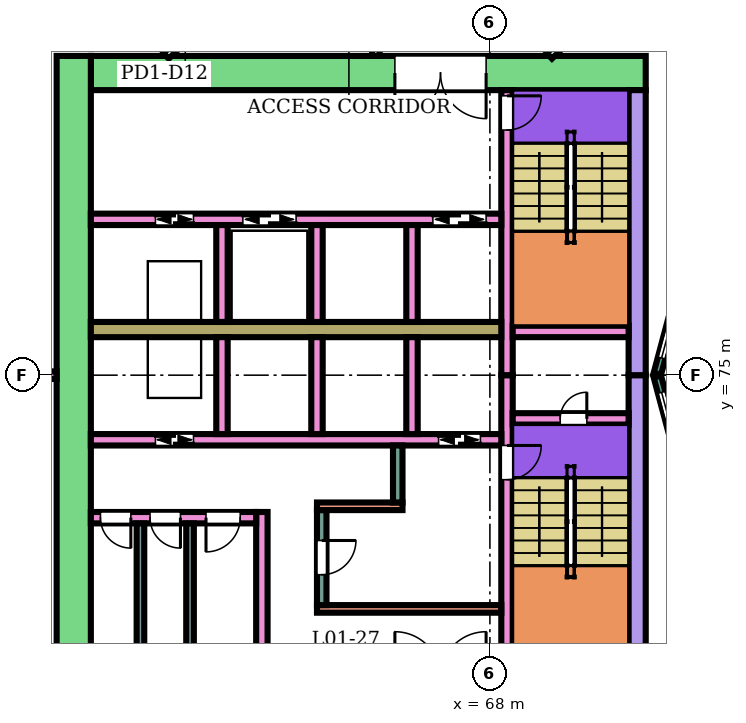
"""IFC4 building model, lengths in metres.
Left out: names, types, materials, properties, quantities, classifications, styles, units other than length and angle.
Written with IfcOpenShell. Run it as: python <this file> out.ifc"""

import sys

from ifc_helpers import new_model, si_unit, direction, frame, frame_2d, origin, place, context, subcontext, project, spatial, rectangle, extrude, element, fill, save


model = new_model("IFC4")
c1 = context("Model", 3, precision=1e-05, world=origin(), true_north=direction((0.0, 1.0)))
c2 = subcontext(c1, "Body", "Model", "MODEL_VIEW")
j1 = project(units=[si_unit("LENGTHUNIT", "METRE"), si_unit("PLANEANGLEUNIT", "RADIAN")], contexts=[c1])
p1 = place(None, origin())
s1 = spatial("IfcSite", under=j1, at=p1, CompositionType="ELEMENT")
p2 = place(p1, origin())
s2 = spatial("IfcBuilding", under=s1, at=p2, CompositionType="ELEMENT")
p3 = place(p2, frame((0.0, 0.0, 7.0)))
s3 = spatial("IfcBuildingStorey", under=s2, at=p3, CompositionType="ELEMENT", Elevation=7.0)
p4 = place(p3, frame((72.1, 82.95, 0.0), z_axis=(0.0, 0.0, 1.0), x_axis=(-1.0, 0.0, 0.0)))
e1 = element("IfcWall", 1, at=p4, inside=s3, PredefinedType="SHEAR", context=c2, shape_type="SweptSolid", body=[
    extrude(rectangle(XDim=14.6, YDim=0.9, at=frame_2d((7.3, 0.0))), origin(), (0.0, 0.0, 1.0), 4.95),
])
p5 = place(p4, frame((4.2, 0.0, 0.0)))
e2 = element("IfcOpeningElement", 2, at=p5, cuts=e1, PredefinedType="OPENING", context=c2, shape_type="SweptSolid", body=[
    extrude(rectangle(XDim=2.4, YDim=2.4, at=frame_2d((1.2, 1.2))), frame((0.0, 0.46, 0.0), z_axis=(0.0, -1.0, 0.0), x_axis=(1.0, 0.0, 0.0)), (0.0, 0.0, 1.0), 0.92),
])
for number, where, z_axis, x_axis in (
    (3, (71.875, 75.0, 0.0), (0.0, 0.0, 1.0), (0.0, -1.0, 0.0)),
    (4, (71.875, 82.5, 0.0), (0.0, 0.0, 1.0), (0.0, -1.0, 0.0)),
):
    element("IfcWall", number, at=place(p3, frame(where, z_axis=z_axis, x_axis=x_axis)), inside=s3, PredefinedType="SHEAR", context=c2, shape_type="SweptSolid", body=[
        extrude(rectangle(XDim=7.5, YDim=0.45, at=frame_2d((3.75, 0.0))), origin(), (0.0, 0.0, 1.0), 4.95),
    ])
p6 = place(p3, frame((57.05, 83.4, 0.0), z_axis=(0.0, 0.0, 1.0), x_axis=(0.0, -1.0, 0.0)))
e5 = element("IfcWall", 5, at=p6, inside=s3, PredefinedType="SHEAR", context=c2, shape_type="SweptSolid", body=[
    extrude(rectangle(XDim=16.8, YDim=0.9, at=frame_2d((8.4, 0.0))), origin(), (0.0, 0.0, 1.0), 4.95),
])
p7 = place(p3, frame((68.45, 75.0, 0.0), z_axis=(0.0, 0.0, 1.0), x_axis=(0.0, -1.0, 0.0)))
e6 = element("IfcWall", 6, at=p7, inside=s3, PredefinedType="SHEAR", context=c2, shape_type="SweptSolid", body=[
    extrude(rectangle(XDim=7.5, YDim=0.3, at=frame_2d((3.75, 0.0))), origin(), (0.0, 0.0, 1.0), 4.95),
])
p8 = place(p7, frame((1.85, 0.0, 0.0)))
e7 = element("IfcOpeningElement", 7, at=p8, cuts=e6, PredefinedType="OPENING", context=c2, shape_type="SweptSolid", body=[
    extrude(rectangle(XDim=0.9, YDim=2.1, at=frame_2d((0.45, 1.05))), frame((0.0, 0.16, 0.0), z_axis=(0.0, -1.0, 0.0), x_axis=(1.0, 0.0, 0.0)), (0.0, 0.0, 1.0), 0.32),
])
p9 = place(p3, frame((68.45, 82.5, 0.0), z_axis=(0.0, 0.0, 1.0), x_axis=(0.0, -1.0, 0.0)))
e8 = element("IfcWall", 8, at=p9, inside=s3, PredefinedType="SHEAR", context=c2, shape_type="SweptSolid", body=[
    extrude(rectangle(XDim=7.5, YDim=0.3, at=frame_2d((3.75, 0.0))), origin(), (0.0, 0.0, 1.0), 4.95),
])
p10 = place(p9, frame((0.15, 0.0, 0.0)))
e9 = element("IfcOpeningElement", 9, at=p10, cuts=e8, PredefinedType="OPENING", context=c2, shape_type="SweptSolid", body=[
    extrude(rectangle(XDim=0.9, YDim=2.1, at=frame_2d((0.45, 1.05))), frame((0.0, 0.16, 0.0), z_axis=(0.0, -1.0, 0.0), x_axis=(1.0, 0.0, 0.0)), (0.0, 0.0, 1.0), 0.32),
])
p11 = place(p3, frame((71.65, 73.85, 0.0), z_axis=(0.0, 0.0, 1.0), x_axis=(-1.0, 0.0, 0.0)))
e10 = element("IfcWall", 10, at=p11, inside=s3, PredefinedType="SHEAR", context=c2, shape_type="SweptSolid", body=[
    extrude(rectangle(XDim=3.05, YDim=0.3, at=frame_2d((1.525, 0.0))), origin(), (0.0, 0.0, 1.0), 4.95),
])
p12 = place(p11, frame((1.1, 0.0, 0.0)))
e11 = element("IfcOpeningElement", 11, at=p12, cuts=e10, PredefinedType="OPENING", context=c2, shape_type="SweptSolid", body=[
    extrude(rectangle(XDim=0.7, YDim=2.0, at=frame_2d((0.35, 1.0))), frame((0.0, 0.16, 0.0), z_axis=(0.0, -1.0, 0.0), x_axis=(1.0, 0.0, 0.0)), (0.0, 0.0, 1.0), 0.32),
])
p13 = place(p3, frame((71.65, 76.15, 0.0), z_axis=(0.0, 0.0, 1.0), x_axis=(-1.0, 0.0, 0.0)))
e12 = element("IfcWall", 12, at=p13, inside=s3, PredefinedType="SHEAR", context=c2, shape_type="SweptSolid", body=[
    extrude(rectangle(XDim=3.05, YDim=0.3, at=frame_2d((1.525, 0.0))), origin(), (0.0, 0.0, 1.0), 4.95),
])
p14 = place(p3, frame((68.3, 73.3, 0.0), z_axis=(0.0, 0.0, 1.0), x_axis=(-1.0, 0.0, 0.0)))
e13 = element("IfcWall", 13, at=p14, inside=s3, PredefinedType="SHEAR", context=c2, shape_type="SweptSolid", body=[
    extrude(rectangle(XDim=10.8, YDim=0.3, at=frame_2d((5.4, 0.0))), origin(), (0.0, 0.0, 1.0), 4.95),
])
p15 = place(p14, frame((0.55, 0.0, 0.0)))
e14 = element("IfcOpeningElement", 14, at=p15, cuts=e13, PredefinedType="OPENING", context=c2, shape_type="SweptSolid", body=[
    extrude(rectangle(XDim=1.1, YDim=2.1, at=frame_2d((0.55, 1.05))), frame((0.0, 0.16, 0.0), z_axis=(0.0, -1.0, 0.0), x_axis=(1.0, 0.0, 0.0)), (0.0, 0.0, 1.0), 0.32),
])
p16 = place(p14, frame((8.1, 0.0, 0.0)))
e15 = element("IfcOpeningElement", 15, at=p16, cuts=e13, PredefinedType="OPENING", context=c2, shape_type="SweptSolid", body=[
    extrude(rectangle(XDim=1.0, YDim=2.1, at=frame_2d((0.5, 1.05))), frame((0.0, 0.16, 0.0), z_axis=(0.0, -1.0, 0.0), x_axis=(1.0, 0.0, 0.0)), (0.0, 0.0, 1.0), 0.32),
])
p17 = place(p3, frame((68.3, 76.2, 0.0), z_axis=(0.0, 0.0, 1.0), x_axis=(-1.0, 0.0, 0.0)))
e16 = element("IfcWall", 16, at=p17, inside=s3, PredefinedType="SHEAR", context=c2, shape_type="SweptSolid", body=[
    extrude(rectangle(XDim=10.8, YDim=0.4, at=frame_2d((5.4, 0.0))), origin(), (0.0, 0.0, 1.0), 4.95),
])
p18 = place(p3, frame((68.3, 79.1, 0.0), z_axis=(0.0, 0.0, 1.0), x_axis=(-1.0, 0.0, 0.0)))
e17 = element("IfcWall", 17, at=p18, inside=s3, PredefinedType="SHEAR", context=c2, shape_type="SweptSolid", body=[
    extrude(rectangle(XDim=10.8, YDim=0.3, at=frame_2d((5.4, 0.0))), origin(), (0.0, 0.0, 1.0), 4.95),
])
p19 = place(p18, frame((0.4, 0.0, 0.0)))
e18 = element("IfcOpeningElement", 18, at=p19, cuts=e17, PredefinedType="OPENING", context=c2, shape_type="SweptSolid", body=[
    extrude(rectangle(XDim=1.4, YDim=2.1, at=frame_2d((0.7, 1.05))), frame((0.0, 0.16, 0.0), z_axis=(0.0, -1.0, 0.0), x_axis=(1.0, 0.0, 0.0)), (0.0, 0.0, 1.0), 0.32),
])
p20 = place(p18, frame((5.4, 0.0, 0.0)))
e19 = element("IfcOpeningElement", 19, at=p20, cuts=e17, PredefinedType="OPENING", context=c2, shape_type="SweptSolid", body=[
    extrude(rectangle(XDim=1.4, YDim=2.1, at=frame_2d((0.7, 1.05))), frame((0.0, 0.16, 0.0), z_axis=(0.0, -1.0, 0.0), x_axis=(1.0, 0.0, 0.0)), (0.0, 0.0, 1.0), 0.32),
])
p21 = place(p18, frame((8.1, 0.0, 0.0)))
e20 = element("IfcOpeningElement", 20, at=p21, cuts=e17, PredefinedType="OPENING", context=c2, shape_type="SweptSolid", body=[
    extrude(rectangle(XDim=1.0, YDim=2.1, at=frame_2d((0.5, 1.05))), frame((0.0, 0.16, 0.0), z_axis=(0.0, -1.0, 0.0), x_axis=(1.0, 0.0, 0.0)), (0.0, 0.0, 1.0), 0.32),
])
for number, where, z_axis, x_axis in (
    (21, (65.95, 76.0, 0.0), (0.0, 0.0, 1.0), (0.0, -1.0, 0.0)),
    (22, (63.45, 76.0, 0.0), (0.0, 0.0, 1.0), (0.0, -1.0, 0.0)),
    (23, (60.95, 76.0, 0.0), (0.0, 0.0, 1.0), (0.0, -1.0, 0.0)),
    (24, (65.95, 78.95, 0.0), (0.0, 0.0, 1.0), (0.0, -1.0, 0.0)),
    (25, (63.45, 78.95, 0.0), (0.0, 0.0, 1.0), (0.0, -1.0, 0.0)),
    (26, (60.95, 78.95, 0.0), (0.0, 0.0, 1.0), (0.0, -1.0, 0.0)),
):
    element("IfcWall", number, at=place(p3, frame(where, z_axis=z_axis, x_axis=x_axis)), inside=s3, PredefinedType="SHEAR", context=c2, shape_type="SweptSolid", body=[
        extrude(rectangle(XDim=2.55, YDim=0.3, at=frame_2d((1.275, 0.0))), origin(), (0.0, 0.0, 1.0), 4.95),
    ])
p22 = place(p3, frame((68.3, 68.85, 0.0), z_axis=(0.0, 0.0, 1.0), x_axis=(-1.0, 0.0, 0.0)))
e27 = element("IfcWall", 27, at=p22, inside=s3, PredefinedType="SHEAR", context=c2, shape_type="SweptSolid", body=[
    extrude(rectangle(XDim=4.85, YDim=0.2, at=frame_2d((2.425, 0.0))), origin(), (0.0, 0.0, 1.0), 4.95),
])
p23 = place(p3, frame((63.575, 71.45, 0.0), z_axis=(0.0, 0.0, 1.0), x_axis=(0.0, -1.0, 0.0)))
e28 = element("IfcWall", 28, at=p23, inside=s3, PredefinedType="SHEAR", context=c2, shape_type="SweptSolid", body=[
    extrude(rectangle(XDim=2.5, YDim=0.25, at=frame_2d((1.25, 0.0))), origin(), (0.0, 0.0, 1.0), 4.95),
])
p24 = place(p23, frame((0.8, 0.0, 0.0)))
e29 = element("IfcOpeningElement", 29, at=p24, cuts=e28, PredefinedType="OPENING", context=c2, shape_type="SweptSolid", body=[
    extrude(rectangle(XDim=0.9, YDim=2.1, at=frame_2d((0.45, 1.05))), frame((0.0, 0.135, 0.0), z_axis=(0.0, -1.0, 0.0), x_axis=(1.0, 0.0, 0.0)), (0.0, 0.0, 1.0), 0.27),
])
p25 = place(p3, frame((65.7, 71.55, 0.0), z_axis=(0.0, 0.0, 1.0), x_axis=(-1.0, 0.0, 0.0)))
e30 = element("IfcWall", 30, at=p25, inside=s3, PredefinedType="SHEAR", context=c2, shape_type="SweptSolid", body=[
    extrude(rectangle(XDim=2.25, YDim=0.2, at=frame_2d((1.125, 0.0))), origin(), (0.0, 0.0, 1.0), 4.95),
])
p26 = place(p3, frame((65.575, 73.15, 0.0), z_axis=(0.0, 0.0, 1.0), x_axis=(0.0, -1.0, 0.0)))
e31 = element("IfcWall", 31, at=p26, inside=s3, PredefinedType="SHEAR", context=c2, shape_type="SweptSolid", body=[
    extrude(rectangle(XDim=1.5, YDim=0.25, at=frame_2d((0.75, 0.0))), origin(), (0.0, 0.0, 1.0), 4.95),
])
p27 = place(p3, frame((62.0, 71.4, 0.0), z_axis=(0.0, 0.0, 1.0), x_axis=(0.0, -1.0, 0.0)))
e32 = element("IfcWall", 32, at=p27, inside=s3, PredefinedType="SHEAR", context=c2, shape_type="SweptSolid", body=[
    extrude(rectangle(XDim=3.9, YDim=0.3, at=frame_2d((1.95, 0.0))), origin(), (0.0, 0.0, 1.0), 4.95),
])
p28 = place(p3, frame((61.85, 71.25, 0.0), z_axis=(0.0, 0.0, 1.0), x_axis=(-1.0, 0.0, 0.0)))
e33 = element("IfcWall", 33, at=p28, inside=s3, PredefinedType="SHEAR", context=c2, shape_type="SweptSolid", body=[
    extrude(rectangle(XDim=4.35, YDim=0.3, at=frame_2d((2.175, 0.0))), origin(), (0.0, 0.0, 1.0), 4.95),
])
p29 = place(p28, frame((0.42, 0.0, 0.0)))
e34 = element("IfcOpeningElement", 34, at=p29, cuts=e33, PredefinedType="OPENING", context=c2, shape_type="SweptSolid", body=[
    extrude(rectangle(XDim=0.9, YDim=2.1, at=frame_2d((0.45, 1.05))), frame((0.0, 0.16, 0.0), z_axis=(0.0, -1.0, 0.0), x_axis=(1.0, 0.0, 0.0)), (0.0, 0.0, 1.0), 0.32),
])
p30 = place(p28, frame((1.992, 0.0, 0.0)))
e35 = element("IfcOpeningElement", 35, at=p30, cuts=e33, PredefinedType="OPENING", context=c2, shape_type="SweptSolid", body=[
    extrude(rectangle(XDim=0.8, YDim=2.1, at=frame_2d((0.4, 1.05))), frame((0.0, 0.16, 0.0), z_axis=(0.0, -1.0, 0.0), x_axis=(1.0, 0.0, 0.0)), (0.0, 0.0, 1.0), 0.32),
])
p31 = place(p28, frame((3.298, 0.0, 0.0)))
e36 = element("IfcOpeningElement", 36, at=p31, cuts=e33, PredefinedType="OPENING", context=c2, shape_type="SweptSolid", body=[
    extrude(rectangle(XDim=0.8, YDim=2.1, at=frame_2d((0.4, 1.05))), frame((0.0, 0.16, 0.0), z_axis=(0.0, -1.0, 0.0), x_axis=(1.0, 0.0, 0.0)), (0.0, 0.0, 1.0), 0.32),
])
p32 = place(p3, frame((73.415, 78.802, 0.0), z_axis=(0.0, 0.0, 1.0), x_axis=(-0.258789828301, -0.965933654434, 0.0)))
e37 = element("IfcWall", 37, at=p32, inside=s3, PredefinedType="NOTDEFINED", context=c2, shape_type="SweptSolid", body=[
    extrude(rectangle(XDim=3.936, YDim=0.2, at=frame_2d((1.968, 0.0))), origin(), (0.0, 0.0, 1.0), 5.4),
])
p33 = place(p32, frame((0.468, 0.0, 0.9)))
e38 = element("IfcOpeningElement", 38, at=p33, cuts=e37, PredefinedType="OPENING", context=c2, shape_type="SweptSolid", body=[
    extrude(rectangle(XDim=3.0, YDim=2.3, at=frame_2d((1.5, 1.15))), frame((0.0, 0.11, 0.0), z_axis=(0.0, -1.0, 0.0), x_axis=(1.0, 0.0, 0.0)), (0.0, 0.0, 1.0), 0.22),
])
p34 = place(p3, frame((72.396, 75.0, 0.0), z_axis=(0.0, 0.0, 1.0), x_axis=(0.258789828301, -0.965933654434, 0.0)))
e39 = element("IfcWall", 39, at=p34, inside=s3, PredefinedType="NOTDEFINED", context=c2, shape_type="SweptSolid", body=[
    extrude(rectangle(XDim=3.936, YDim=0.2, at=frame_2d((1.968, 0.0))), origin(), (0.0, 0.0, 1.0), 5.4),
])
p35 = place(p34, frame((0.468, 0.0, 0.9)))
e40 = element("IfcOpeningElement", 40, at=p35, cuts=e39, PredefinedType="OPENING", context=c2, shape_type="SweptSolid", body=[
    extrude(rectangle(XDim=3.0, YDim=2.3, at=frame_2d((1.5, 1.15))), frame((0.0, 0.11, 0.0), z_axis=(0.0, -1.0, 0.0), x_axis=(1.0, 0.0, 0.0)), (0.0, 0.0, 1.0), 0.22),
])
p36 = place(p3, frame((39.204, 75.0, 0.0), z_axis=(0.0, 0.0, 1.0), x_axis=(1.0, 0.0, 0.0)))
e41 = element("IfcWall", 41, at=p36, inside=s3, PredefinedType="PARTITIONING", context=c2, shape_type="SweptSolid", body=[
    extrude(rectangle(XDim=17.394, YDim=0.2, at=frame_2d((8.697, 0.0))), origin(), (0.0, 0.0, 1.0), 3.35),
])
p37 = place(p3, frame((59.48, 83.4, 0.0), z_axis=(0.0, 0.0, 1.0), x_axis=(0.71978771682, 0.694194239903, 0.0)))
e42 = element("IfcWall", 42, at=p37, inside=s3, PredefinedType="PARTITIONING", context=c2, shape_type="SweptSolid", body=[
    extrude(rectangle(XDim=8.471, YDim=0.2, at=frame_2d((4.235, 0.0))), origin(), (0.0, 0.0, 1.0), 4.95),
])
p38 = place(p37, frame((7.413, 0.0, 0.0)))
e43 = element("IfcOpeningElement", 43, at=p38, cuts=e42, PredefinedType="OPENING", context=c2, shape_type="SweptSolid", body=[
    extrude(rectangle(XDim=0.9, YDim=2.1, at=frame_2d((0.45, 1.05))), frame((0.0, 0.11, 0.0), z_axis=(0.0, -1.0, 0.0), x_axis=(1.0, 0.0, 0.0)), (0.0, 0.0, 1.0), 0.22),
])
p39 = place(p37, frame((5.84, 0.0, 0.0)))
e44 = element("IfcOpeningElement", 44, at=p39, cuts=e42, PredefinedType="OPENING", context=c2, shape_type="SweptSolid", body=[
    extrude(rectangle(XDim=0.9, YDim=2.1, at=frame_2d((0.45, 1.05))), frame((0.0, 0.11, 0.0), z_axis=(0.0, -1.0, 0.0), x_axis=(1.0, 0.0, 0.0)), (0.0, 0.0, 1.0), 0.22),
])
p40 = place(p37, frame((4.055, 0.0, 0.0)))
e45 = element("IfcOpeningElement", 45, at=p40, cuts=e42, PredefinedType="OPENING", context=c2, shape_type="SweptSolid", body=[
    extrude(rectangle(XDim=0.9, YDim=2.1, at=frame_2d((0.45, 1.05))), frame((0.0, 0.11, 0.0), z_axis=(0.0, -1.0, 0.0), x_axis=(1.0, 0.0, 0.0)), (0.0, 0.0, 1.0), 0.22),
])
p41 = place(p37, frame((2.256, 0.0, 0.0)))
e46 = element("IfcOpeningElement", 46, at=p41, cuts=e42, PredefinedType="OPENING", context=c2, shape_type="SweptSolid", body=[
    extrude(rectangle(XDim=0.9, YDim=2.1, at=frame_2d((0.45, 1.05))), frame((0.0, 0.11, 0.0), z_axis=(0.0, -1.0, 0.0), x_axis=(1.0, 0.0, 0.0)), (0.0, 0.0, 1.0), 0.22),
])
p42 = place(p37, frame((0.251, 0.0, 0.0)))
e47 = element("IfcOpeningElement", 47, at=p42, cuts=e42, PredefinedType="OPENING", context=c2, shape_type="SweptSolid", body=[
    extrude(rectangle(XDim=0.9, YDim=2.1, at=frame_2d((0.45, 1.05))), frame((0.0, 0.11, 0.0), z_axis=(0.0, -1.0, 0.0), x_axis=(1.0, 0.0, 0.0)), (0.0, 0.0, 1.0), 0.22),
])
p43 = place(p3, frame((65.0, 83.401, 0.0), z_axis=(0.0, 0.0, 1.0), x_axis=(0.0, 1.0, 0.0)))
e48 = element("IfcWall", 48, at=p43, inside=s3, PredefinedType="PARTITIONING", context=c2, shape_type="SweptSolid", body=[
    extrude(rectangle(XDim=1.399, YDim=0.2, at=frame_2d((0.7, 0.0))), origin(), (0.0, 0.0, 1.0), 4.95),
])
p44 = place(p3, frame((69.563, 83.4, 0.0), z_axis=(0.0, 0.0, 1.0), x_axis=(0.719454254864, 0.694539829785, 0.0)))
e49 = element("IfcWall", 49, at=p44, inside=s3, PredefinedType="PARTITIONING", context=c2, shape_type="SweptSolid", body=[
    extrude(rectangle(XDim=4.86, YDim=0.2, at=frame_2d((2.43, 0.0))), origin(), (0.0, 0.0, 1.0), 4.95),
])
p45 = place(p44, frame((2.035, 0.0, 0.0)))
e50 = element("IfcOpeningElement", 50, at=p45, cuts=e49, PredefinedType="OPENING", context=c2, shape_type="SweptSolid", body=[
    extrude(rectangle(XDim=0.9, YDim=2.1, at=frame_2d((0.45, 1.05))), frame((0.0, 0.11, 0.0), z_axis=(0.0, -1.0, 0.0), x_axis=(1.0, 0.0, 0.0)), (0.0, 0.0, 1.0), 0.22),
])
for number, where, z_axis, x_axis in (
    (51, (60.11, 71.1, 0.0), (0.0, 0.0, 1.0), (0.0, -1.0, 0.0)),
    (52, (58.805, 71.1, 0.0), (0.0, 0.0, 1.0), (0.0, -1.0, 0.0)),
):
    element("IfcWall", number, at=place(p3, frame(where, z_axis=z_axis, x_axis=x_axis)), inside=s3, PredefinedType="PARTITIONING", context=c2, shape_type="SweptSolid", body=[
        extrude(rectangle(XDim=3.6, YDim=0.2, at=frame_2d((1.8, 0.0))), origin(), (0.0, 0.0, 1.0), 4.95),
    ])
p46 = place(p33, origin())
e53 = element("IfcWindow", 53, at=p46, inside=s3, PartitioningType="SINGLE_PANEL", PredefinedType="WINDOW", context=c2, shape_type="SweptSolid", body=[
    extrude(rectangle(XDim=3.0, YDim=2.3, at=frame_2d((1.5, 1.15))), frame((0.0, 0.03, 0.0), z_axis=(0.0, -1.0, 0.0), x_axis=(1.0, 0.0, 0.0)), (0.0, 0.0, 1.0), 0.06),
])
fill(e38, e53)
p47 = place(p35, origin())
e54 = element("IfcWindow", 54, at=p47, inside=s3, PartitioningType="SINGLE_PANEL", PredefinedType="WINDOW", context=c2, shape_type="SweptSolid", body=[
    extrude(rectangle(XDim=3.0, YDim=2.3, at=frame_2d((1.5, 1.15))), frame((0.0, 0.03, 0.0), z_axis=(0.0, -1.0, 0.0), x_axis=(1.0, 0.0, 0.0)), (0.0, 0.0, 1.0), 0.06),
])
fill(e40, e54)
p48 = place(p12, frame((0.7, 0.0, 0.0), z_axis=(0.0, 0.0, 1.0), x_axis=(-1.0, 0.0, 0.0)))
e55 = element("IfcDoor", 55, at=p48, inside=s3, OperationType="SINGLE_SWING_RIGHT", PredefinedType="DOOR", context=c2, shape_type="SweptSolid", body=[
    extrude(rectangle(XDim=0.7, YDim=2.0, at=frame_2d((0.35, 1.0))), frame((0.0, 0.025, 0.0), z_axis=(0.0, -1.0, 0.0), x_axis=(1.0, 0.0, 0.0)), (0.0, 0.0, 1.0), 0.05),
])
fill(e11, e55)
p49 = place(p8, origin())
e56 = element("IfcDoor", 56, at=p49, inside=s3, OperationType="SINGLE_SWING_LEFT", PredefinedType="DOOR", context=c2, shape_type="SweptSolid", body=[
    extrude(rectangle(XDim=0.9, YDim=2.1, at=frame_2d((0.45, 1.05))), frame((0.0, 0.025, 0.0), z_axis=(0.0, -1.0, 0.0), x_axis=(1.0, 0.0, 0.0)), (0.0, 0.0, 1.0), 0.05),
])
fill(e7, e56)
p50 = place(p10, origin())
e57 = element("IfcDoor", 57, at=p50, inside=s3, OperationType="SINGLE_SWING_LEFT", PredefinedType="DOOR", context=c2, shape_type="SweptSolid", body=[
    extrude(rectangle(XDim=0.9, YDim=2.1, at=frame_2d((0.45, 1.05))), frame((0.0, 0.025, 0.0), z_axis=(0.0, -1.0, 0.0), x_axis=(1.0, 0.0, 0.0)), (0.0, 0.0, 1.0), 0.05),
])
fill(e9, e57)
p51 = place(p15, origin())
e58 = element("IfcDoor", 58, at=p51, inside=s3, OperationType="DOUBLE_DOOR_SLIDING", PredefinedType="DOOR", context=c2, shape_type="SweptSolid", body=[
    extrude(rectangle(XDim=1.1, YDim=2.1, at=frame_2d((0.55, 1.05))), frame((0.0, 0.025, 0.0), z_axis=(0.0, -1.0, 0.0), x_axis=(1.0, 0.0, 0.0)), (0.0, 0.0, 1.0), 0.05),
])
fill(e14, e58)
p52 = place(p16, origin())
e59 = element("IfcDoor", 59, at=p52, inside=s3, OperationType="DOUBLE_DOOR_SLIDING", PredefinedType="DOOR", context=c2, shape_type="SweptSolid", body=[
    extrude(rectangle(XDim=1.0, YDim=2.1, at=frame_2d((0.5, 1.05))), frame((0.0, 0.025, 0.0), z_axis=(0.0, -1.0, 0.0), x_axis=(1.0, 0.0, 0.0)), (0.0, 0.0, 1.0), 0.05),
])
fill(e15, e59)
p53 = place(p19, origin())
e60 = element("IfcDoor", 60, at=p53, inside=s3, OperationType="DOUBLE_DOOR_SLIDING", PredefinedType="DOOR", context=c2, shape_type="SweptSolid", body=[
    extrude(rectangle(XDim=1.4, YDim=2.1, at=frame_2d((0.7, 1.05))), frame((0.0, 0.025, 0.0), z_axis=(0.0, -1.0, 0.0), x_axis=(1.0, 0.0, 0.0)), (0.0, 0.0, 1.0), 0.05),
])
fill(e18, e60)
p54 = place(p20, origin())
e61 = element("IfcDoor", 61, at=p54, inside=s3, OperationType="DOUBLE_DOOR_SLIDING", PredefinedType="DOOR", context=c2, shape_type="SweptSolid", body=[
    extrude(rectangle(XDim=1.4, YDim=2.1, at=frame_2d((0.7, 1.05))), frame((0.0, 0.025, 0.0), z_axis=(0.0, -1.0, 0.0), x_axis=(1.0, 0.0, 0.0)), (0.0, 0.0, 1.0), 0.05),
])
fill(e19, e61)
p55 = place(p21, origin())
e62 = element("IfcDoor", 62, at=p55, inside=s3, OperationType="DOUBLE_DOOR_SLIDING", PredefinedType="DOOR", context=c2, shape_type="SweptSolid", body=[
    extrude(rectangle(XDim=1.0, YDim=2.1, at=frame_2d((0.5, 1.05))), frame((0.0, 0.025, 0.0), z_axis=(0.0, -1.0, 0.0), x_axis=(1.0, 0.0, 0.0)), (0.0, 0.0, 1.0), 0.05),
])
fill(e20, e62)
p56 = place(p24, origin())
e63 = element("IfcDoor", 63, at=p56, inside=s3, OperationType="SINGLE_SWING_LEFT", PredefinedType="DOOR", context=c2, shape_type="SweptSolid", body=[
    extrude(rectangle(XDim=0.9, YDim=2.1, at=frame_2d((0.45, 1.05))), frame((0.0, 0.025, 0.0), z_axis=(0.0, -1.0, 0.0), x_axis=(1.0, 0.0, 0.0)), (0.0, 0.0, 1.0), 0.05),
])
fill(e29, e63)
p57 = place(p29, origin())
e64 = element("IfcDoor", 64, at=p57, inside=s3, OperationType="SINGLE_SWING_RIGHT", PredefinedType="DOOR", context=c2, shape_type="SweptSolid", body=[
    extrude(rectangle(XDim=0.9, YDim=2.1, at=frame_2d((0.45, 1.05))), frame((0.0, 0.025, 0.0), z_axis=(0.0, -1.0, 0.0), x_axis=(1.0, 0.0, 0.0)), (0.0, 0.0, 1.0), 0.05),
])
fill(e34, e64)
p58 = place(p30, origin())
e65 = element("IfcDoor", 65, at=p58, inside=s3, OperationType="SINGLE_SWING_LEFT", PredefinedType="DOOR", context=c2, shape_type="SweptSolid", body=[
    extrude(rectangle(XDim=0.8, YDim=2.1, at=frame_2d((0.4, 1.05))), frame((0.0, 0.025, 0.0), z_axis=(0.0, -1.0, 0.0), x_axis=(1.0, 0.0, 0.0)), (0.0, 0.0, 1.0), 0.05),
])
fill(e35, e65)
p59 = place(p31, origin())
e66 = element("IfcDoor", 66, at=p59, inside=s3, OperationType="SINGLE_SWING_LEFT", PredefinedType="DOOR", context=c2, shape_type="SweptSolid", body=[
    extrude(rectangle(XDim=0.8, YDim=2.1, at=frame_2d((0.4, 1.05))), frame((0.0, 0.025, 0.0), z_axis=(0.0, -1.0, 0.0), x_axis=(1.0, 0.0, 0.0)), (0.0, 0.0, 1.0), 0.05),
])
fill(e36, e66)
p60 = place(p5, origin())
e67 = element("IfcDoor", 67, at=p60, inside=s3, OperationType="DOUBLE_DOOR_SINGLE_SWING", PredefinedType="DOOR", context=c2, shape_type="SweptSolid", body=[
    extrude(rectangle(XDim=2.4, YDim=2.4, at=frame_2d((1.2, 1.2))), frame((0.0, 0.025, 0.0), z_axis=(0.0, -1.0, 0.0), x_axis=(1.0, 0.0, 0.0)), (0.0, 0.0, 1.0), 0.05),
])
fill(e2, e67)
save(model, sys.argv[1])
